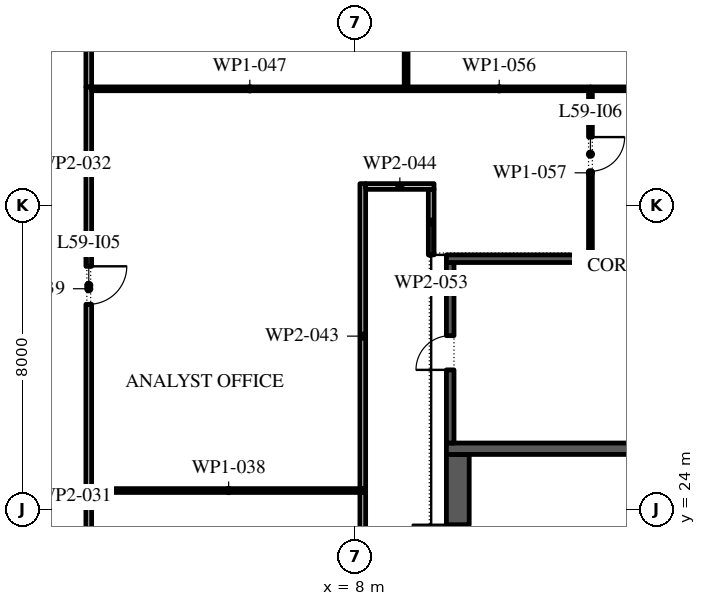
"""IFC4 building model, lengths in metres.
Left out: names, types, materials, properties, quantities, classifications, styles, units other than length and angle.
Written with IfcOpenShell. Run it as: python <this file> out.ifc"""

import sys

from ifc_helpers import new_model, si_unit, direction, frame, frame_2d, origin, place, context, subcontext, project, spatial, rectangle, extrude, element, fill, save


model = new_model("IFC4")
c1 = context("Model", 3, precision=1e-05, world=origin(), true_north=direction((0.0, 1.0)))
c2 = subcontext(c1, "Body", "Model", "MODEL_VIEW")
j1 = project(units=[si_unit("LENGTHUNIT", "METRE"), si_unit("PLANEANGLEUNIT", "RADIAN")], contexts=[c1])
p1 = place(None, origin())
s1 = spatial("IfcSite", under=j1, at=p1, CompositionType="ELEMENT")
p2 = place(p1, origin())
s2 = spatial("IfcBuilding", under=s1, at=p2, CompositionType="ELEMENT")
p3 = place(p2, frame((0.0, 0.0, 272.4)))
s3 = spatial("IfcBuildingStorey", under=s2, at=p3, CompositionType="ELEMENT", Elevation=272.4)
p4 = place(p3, frame((10.7, -2.45, 0.0), z_axis=(0.0, 0.0, 1.0), x_axis=(0.0, 1.0, 0.0)))
e1 = element("IfcWall", 1, at=p4, inside=s3, PredefinedType="SHEAR", context=c2, shape_type="SweptSolid", body=[
    extrude(rectangle(XDim=27.9, YDim=0.6, at=frame_2d((13.95, 0.0))), origin(), (0.0, 0.0, 1.0), 4.0),
])
p5 = place(p4, frame((23.65, 0.0, 0.0)))
e2 = element("IfcOpeningElement", 2, at=p5, cuts=e1, PredefinedType="OPENING", context=c2, shape_type="SweptSolid", body=[
    extrude(rectangle(XDim=2.4, YDim=2.1, at=frame_2d((1.2, 1.05))), frame((0.0, 0.31, 0.0), z_axis=(0.0, -1.0, 0.0), x_axis=(1.0, 0.0, 0.0)), (0.0, 0.0, 1.0), 0.62),
])
p6 = place(p4, frame((1.087, 0.0, 0.0)))
e3 = element("IfcOpeningElement", 3, at=p6, cuts=e1, PredefinedType="OPENING", context=c2, shape_type="SweptSolid", body=[
    extrude(rectangle(XDim=0.9, YDim=2.1, at=frame_2d((0.45, 1.05))), frame((0.0, 0.31, 0.0), z_axis=(0.0, -1.0, 0.0), x_axis=(1.0, 0.0, 0.0)), (0.0, 0.0, 1.0), 0.62),
])
p7 = place(p4, frame((4.262, 0.0, 0.0)))
e4 = element("IfcOpeningElement", 4, at=p7, cuts=e1, PredefinedType="OPENING", context=c2, shape_type="SweptSolid", body=[
    extrude(rectangle(XDim=1.0, YDim=2.1, at=frame_2d((0.5, 1.05))), frame((0.0, 0.31, 0.0), z_axis=(0.0, -1.0, 0.0), x_axis=(1.0, 0.0, 0.0)), (0.0, 0.0, 1.0), 0.62),
])
p8 = place(p3, frame((10.4, 25.6, 0.0), z_axis=(0.0, 0.0, 1.0), x_axis=(1.0, 0.0, 0.0)))
e5 = element("IfcWall", 5, at=p8, inside=s3, PredefinedType="SHEAR", context=c2, shape_type="SweptSolid", body=[
    extrude(rectangle(XDim=11.2, YDim=0.3, at=frame_2d((5.6, 0.0))), origin(), (0.0, 0.0, 1.0), 4.0),
])
p9 = place(p3, frame((10.5, 25.75, 0.0), z_axis=(0.0, 0.0, 1.0), x_axis=(0.0, 1.0, 0.0)))
e6 = element("IfcWall", 6, at=p9, inside=s3, PredefinedType="SHEAR", context=c2, shape_type="SweptSolid", body=[
    extrude(rectangle(XDim=4.75, YDim=0.2, at=frame_2d((2.375, 0.0))), origin(), (0.0, 0.0, 1.0), 4.0),
])
p10 = place(p9, frame((1.925, 0.0, 0.0)))
e7 = element("IfcOpeningElement", 7, at=p10, cuts=e6, PredefinedType="OPENING", context=c2, shape_type="SweptSolid", body=[
    extrude(rectangle(XDim=0.9, YDim=2.1, at=frame_2d((0.45, 1.05))), frame((0.0, 0.11, 0.0), z_axis=(0.0, -1.0, 0.0), x_axis=(1.0, 0.0, 0.0)), (0.0, 0.0, 1.0), 0.22),
])
p11 = place(p3, frame((10.4, 30.6, 0.0), z_axis=(0.0, 0.0, 1.0), x_axis=(1.0, 0.0, 0.0)))
e8 = element("IfcWall", 8, at=p11, inside=s3, PredefinedType="SHEAR", context=c2, shape_type="SweptSolid", body=[
    extrude(rectangle(XDim=11.2, YDim=0.2, at=frame_2d((5.6, 0.0))), origin(), (0.0, 0.0, 1.0), 4.0),
])
p12 = place(p3, frame((0.99, 24.5, 0.0), z_axis=(0.0, 0.0, 1.0), x_axis=(0.0, -1.0, 0.0)))
e9 = element("IfcWall", 9, at=p12, inside=s3, PredefinedType="PARTITIONING", context=c2, shape_type="SweptSolid", body=[
    extrude(rectangle(XDim=5.425, YDim=0.15, at=frame_2d((2.712, 0.0))), origin(), (0.0, 0.0, 1.0), 4.0),
])
p13 = place(p3, frame((1.065, 24.5, 0.0), z_axis=(0.0, 0.0, 1.0), x_axis=(1.0, 0.0, 0.0)))
e10 = element("IfcWall", 10, at=p13, inside=s3, PredefinedType="PARTITIONING", context=c2, shape_type="SweptSolid", body=[
    extrude(rectangle(XDim=7.21, YDim=0.1, at=frame_2d((3.605, 0.0))), origin(), (0.0, 0.0, 1.0), 4.0),
])
p14 = place(p3, frame((0.99, 35.12, 0.0), z_axis=(0.0, 0.0, 1.0), x_axis=(0.0, -1.0, 0.0)))
e11 = element("IfcWall", 11, at=p14, inside=s3, PredefinedType="PARTITIONING", context=c2, shape_type="SweptSolid", body=[
    extrude(rectangle(XDim=10.62, YDim=0.15, at=frame_2d((5.31, 0.0))), origin(), (0.0, 0.0, 1.0), 4.0),
])
p15 = place(p14, frame((4.72, 0.0, 0.0)))
e12 = element("IfcOpeningElement", 12, at=p15, cuts=e11, PredefinedType="OPENING", context=c2, shape_type="SweptSolid", body=[
    extrude(rectangle(XDim=1.0, YDim=2.1, at=frame_2d((0.5, 1.05))), frame((0.0, 0.085, 0.0), z_axis=(0.0, -1.0, 0.0), x_axis=(1.0, 0.0, 0.0)), (0.0, 0.0, 1.0), 0.17),
])
p16 = place(p3, frame((0.99, 41.55, 0.0), z_axis=(0.0, 0.0, 1.0), x_axis=(0.0, -1.0, 0.0)))
e13 = element("IfcWall", 13, at=p16, inside=s3, PredefinedType="PARTITIONING", context=c2, shape_type="SweptSolid", body=[
    extrude(rectangle(XDim=6.43, YDim=0.15, at=frame_2d((3.215, 0.0))), origin(), (0.0, 0.0, 1.0), 4.0),
])
p17 = place(p16, frame((4.08, 0.0, 0.0)))
e14 = element("IfcOpeningElement", 14, at=p17, cuts=e13, PredefinedType="OPENING", context=c2, shape_type="SweptSolid", body=[
    extrude(rectangle(XDim=1.0, YDim=2.1, at=frame_2d((0.5, 1.05))), frame((0.0, 0.085, 0.0), z_axis=(0.0, -1.0, 0.0), x_axis=(1.0, 0.0, 0.0)), (0.0, 0.0, 1.0), 0.17),
])
p18 = place(p3, frame((8.2, 19.075, 0.0), z_axis=(0.0, 0.0, 1.0), x_axis=(0.0, 1.0, 0.0)))
e15 = element("IfcWall", 15, at=p18, inside=s3, PredefinedType="PARTITIONING", context=c2, shape_type="SweptSolid", body=[
    extrude(rectangle(XDim=5.375, YDim=0.15, at=frame_2d((2.688, 0.0))), origin(), (0.0, 0.0, 1.0), 4.0),
])
p19 = place(p3, frame((8.2, 24.55, 0.0), z_axis=(0.0, 0.0, 1.0), x_axis=(0.0, 1.0, 0.0)))
e16 = element("IfcWall", 16, at=p19, inside=s3, PredefinedType="PARTITIONING", context=c2, shape_type="SweptSolid", body=[
    extrude(rectangle(XDim=8.025, YDim=0.15, at=frame_2d((4.012, 0.0))), origin(), (0.0, 0.0, 1.0), 4.0),
])
p20 = place(p3, frame((8.275, 32.5, 0.0), z_axis=(0.0, 0.0, 1.0), x_axis=(1.0, 0.0, 0.0)))
e17 = element("IfcWall", 17, at=p20, inside=s3, PredefinedType="PARTITIONING", context=c2, shape_type="SweptSolid", body=[
    extrude(rectangle(XDim=1.8, YDim=0.15, at=frame_2d((0.9, 0.0))), origin(), (0.0, 0.0, 1.0), 4.0),
])
p21 = place(p3, frame((9.39, 35.07, 0.0), z_axis=(0.0, 0.0, 1.0), x_axis=(-1.0, 0.0, 0.0)))
e18 = element("IfcWall", 18, at=p21, inside=s3, PredefinedType="PARTITIONING", context=c2, shape_type="SweptSolid", body=[
    extrude(rectangle(XDim=8.325, YDim=0.1, at=frame_2d((4.163, 0.0))), origin(), (0.0, 0.0, 1.0), 4.0),
])
p22 = place(p3, frame((9.34, 35.12, 0.0), z_axis=(0.0, 0.0, 1.0), x_axis=(0.0, 1.0, 0.0)))
e19 = element("IfcWall", 19, at=p22, inside=s3, PredefinedType="PARTITIONING", context=c2, shape_type="SweptSolid", body=[
    extrude(rectangle(XDim=6.43, YDim=0.1, at=frame_2d((3.215, 0.0))), origin(), (0.0, 0.0, 1.0), 4.0),
])
p23 = place(p22, frame((3.9, 0.0, 0.0)))
e20 = element("IfcOpeningElement", 20, at=p23, cuts=e19, PredefinedType="OPENING", context=c2, shape_type="SweptSolid", body=[
    extrude(rectangle(XDim=0.9, YDim=2.1, at=frame_2d((0.45, 1.05))), frame((0.0, 0.06, 0.0), z_axis=(0.0, -1.0, 0.0), x_axis=(1.0, 0.0, 0.0)), (0.0, 0.0, 1.0), 0.12),
])
p24 = place(p3, frame((10.0, 32.425, 0.0), z_axis=(0.0, 0.0, 1.0), x_axis=(0.0, -1.0, 0.0)))
e21 = element("IfcWall", 21, at=p24, inside=s3, PredefinedType="PARTITIONING", context=c2, shape_type="SweptSolid", body=[
    extrude(rectangle(XDim=1.725, YDim=0.15, at=frame_2d((0.863, 0.0))), origin(), (0.0, 0.0, 1.0), 4.0),
])
p25 = place(p3, frame((14.19, 35.07, 0.0), z_axis=(0.0, 0.0, 1.0), x_axis=(-1.0, 0.0, 0.0)))
e22 = element("IfcWall", 22, at=p25, inside=s3, PredefinedType="PARTITIONING", context=c2, shape_type="SweptSolid", body=[
    extrude(rectangle(XDim=4.8, YDim=0.1, at=frame_2d((2.4, 0.0))), origin(), (0.0, 0.0, 1.0), 4.0),
])
p26 = place(p3, frame((14.19, 35.02, 0.0), z_axis=(0.0, 0.0, 1.0), x_axis=(0.0, -1.0, 0.0)))
e23 = element("IfcWall", 23, at=p26, inside=s3, PredefinedType="PARTITIONING", context=c2, shape_type="SweptSolid", body=[
    extrude(rectangle(XDim=4.32, YDim=0.1, at=frame_2d((2.16, 0.0))), origin(), (0.0, 0.0, 1.0), 4.0),
])
p27 = place(p26, frame((1.22, 0.0, 0.0)))
e24 = element("IfcOpeningElement", 24, at=p27, cuts=e23, PredefinedType="OPENING", context=c2, shape_type="SweptSolid", body=[
    extrude(rectangle(XDim=0.9, YDim=2.1, at=frame_2d((0.45, 1.05))), frame((0.0, 0.06, 0.0), z_axis=(0.0, -1.0, 0.0), x_axis=(1.0, 0.0, 0.0)), (0.0, 0.0, 1.0), 0.12),
])
p28 = place(p3, frame((21.98, 35.07, 0.0), z_axis=(0.0, 0.0, 1.0), x_axis=(-1.0, 0.0, 0.0)))
e25 = element("IfcWall", 25, at=p28, inside=s3, PredefinedType="PARTITIONING", context=c2, shape_type="SweptSolid", body=[
    extrude(rectangle(XDim=7.79, YDim=0.1, at=frame_2d((3.895, 0.0))), origin(), (0.0, 0.0, 1.0), 4.0),
])
p29 = place(p5, origin())
e26 = element("IfcDoor", 26, at=p29, inside=s3, OperationType="DOUBLE_DOOR_SINGLE_SWING", PredefinedType="DOOR", context=c2, shape_type="SweptSolid", body=[
    extrude(rectangle(XDim=2.4, YDim=2.1, at=frame_2d((1.2, 1.05))), frame((0.0, 0.025, 0.0), z_axis=(0.0, -1.0, 0.0), x_axis=(1.0, 0.0, 0.0)), (0.0, 0.0, 1.0), 0.05),
])
fill(e2, e26)
p30 = place(p10, origin())
e27 = element("IfcDoor", 27, at=p30, inside=s3, OperationType="SINGLE_SWING_RIGHT", PredefinedType="DOOR", context=c2, shape_type="SweptSolid", body=[
    extrude(rectangle(XDim=0.9, YDim=2.1, at=frame_2d((0.45, 1.05))), frame((0.0, -0.05, 0.0), z_axis=(0.0, -1.0, 0.0), x_axis=(1.0, 0.0, 0.0)), (0.0, 0.0, 1.0), 0.05),
])
fill(e7, e27)
p31 = place(p15, origin())
e28 = element("IfcDoor", 28, at=p31, inside=s3, OperationType="SINGLE_SWING_RIGHT", PredefinedType="DOOR", context=c2, shape_type="SweptSolid", body=[
    extrude(rectangle(XDim=1.0, YDim=2.1, at=frame_2d((0.5, 1.05))), frame((0.0, 0.025, 0.0), z_axis=(0.0, -1.0, 0.0), x_axis=(1.0, 0.0, 0.0)), (0.0, 0.0, 1.0), 0.05),
])
fill(e12, e28)
p32 = place(p27, origin())
e29 = element("IfcDoor", 29, at=p32, inside=s3, OperationType="SINGLE_SWING_RIGHT", PredefinedType="DOOR", context=c2, shape_type="SweptSolid", body=[
    extrude(rectangle(XDim=0.9, YDim=2.1, at=frame_2d((0.45, 1.05))), frame((0.0, 0.025, 0.0), z_axis=(0.0, -1.0, 0.0), x_axis=(1.0, 0.0, 0.0)), (0.0, 0.0, 1.0), 0.05),
])
fill(e24, e29)
save(model, sys.argv[1])
